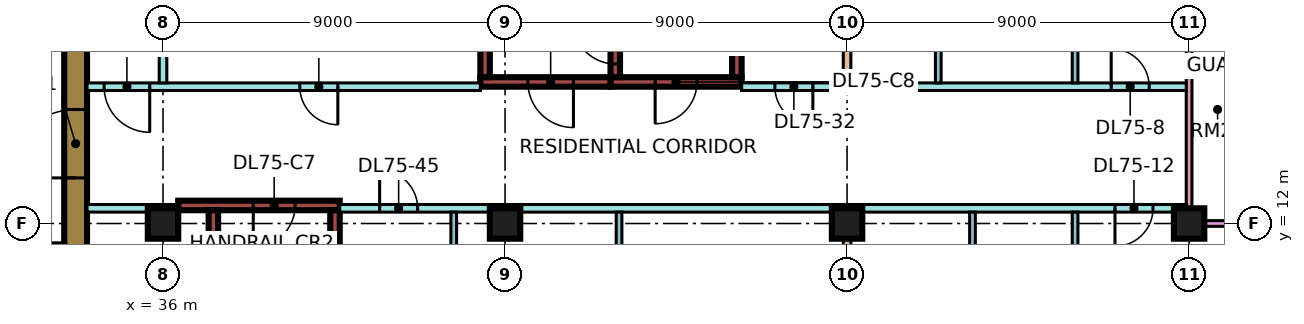
"""IFC4 building model, lengths in metres.
Left out: names, types, materials, properties, quantities, classifications, styles, units other than length and angle.
Written with IfcOpenShell. Run it as: python <this file> out.ifc"""

import sys

from ifc_helpers import new_model, si_unit, direction, frame, frame_2d, origin, origin_2d, place, context, subcontext, project, spatial, rectangle, extrude, element, fill, save


model = new_model("IFC4")
c1 = context("Model", 3, precision=1e-05, world=origin(), true_north=direction((0.0, 1.0)))
c2 = subcontext(c1, "Body", "Model", "MODEL_VIEW")
j1 = project(units=[si_unit("LENGTHUNIT", "METRE"), si_unit("PLANEANGLEUNIT", "RADIAN")], contexts=[c1])
p1 = place(None, origin())
s1 = spatial("IfcSite", under=j1, at=p1, CompositionType="ELEMENT")
p2 = place(p1, origin())
s2 = spatial("IfcBuilding", under=s1, at=p2, CompositionType="ELEMENT")
p3 = place(p2, frame((0.0, 0.0, 318.4)))
s3 = spatial("IfcBuildingStorey", under=s2, at=p3, CompositionType="ELEMENT", Elevation=318.4)
for number, where, z_axis, x_axis in (
    (1, (36.0, 12.0, 0.0), (0.0, 0.0, 1.0), (1.0, 0.0, 0.0)),
    (2, (45.0, 12.0, 0.0), (0.0, 0.0, 1.0), (1.0, 0.0, 0.0)),
    (3, (54.0, 12.0, 0.0), (0.0, 0.0, 1.0), (1.0, 0.0, 0.0)),
    (4, (63.0, 12.0, 0.0), (0.0, 0.0, 1.0), (1.0, 0.0, 0.0)),
):
    element("IfcColumn", number, at=place(p3, frame(where, z_axis=z_axis, x_axis=x_axis)), inside=s3, PredefinedType="COLUMN", context=c2, shape_type="SweptSolid", body=[
        extrude(rectangle(XDim=0.8, YDim=0.8, at=origin_2d()), origin(), (0.0, 0.0, 1.0), 3.75),
    ])
p4 = place(p3, frame((33.7, 7.6, 0.0), z_axis=(0.0, 0.0, 1.0), x_axis=(0.0, 1.0, 0.0)))
e5 = element("IfcWall", 5, at=p4, inside=s3, PredefinedType="SHEAR", context=c2, shape_type="SweptSolid", body=[
    extrude(rectangle(XDim=11.8, YDim=0.6, at=frame_2d((5.9, 0.0))), origin(), (0.0, 0.0, 1.0), 3.75),
])
p5 = place(p4, frame((5.6, 0.0, 0.0)))
e6 = element("IfcOpeningElement", 6, at=p5, cuts=e5, PredefinedType="OPENING", context=c2, shape_type="SweptSolid", body=[
    extrude(rectangle(XDim=1.8, YDim=2.4, at=frame_2d((0.9, 1.2))), frame((0.0, 0.31, 0.0), z_axis=(0.0, -1.0, 0.0), x_axis=(1.0, 0.0, 0.0)), (0.0, 0.0, 1.0), 0.62),
])
p6 = place(p3, frame((36.4, 12.475, 0.0), z_axis=(0.0, 0.0, 1.0), x_axis=(1.0, 0.0, 0.0)))
e7 = element("IfcWall", 7, at=p6, inside=s3, PredefinedType="SHEAR", context=c2, shape_type="SweptSolid", body=[
    extrude(rectangle(XDim=4.25, YDim=0.25, at=frame_2d((2.125, 0.0))), origin(), (0.0, 0.0, 1.0), 3.75),
])
p7 = place(p6, frame((1.975, 0.0, 0.0)))
e8 = element("IfcOpeningElement", 8, at=p7, cuts=e7, PredefinedType="OPENING", context=c2, shape_type="SweptSolid", body=[
    extrude(rectangle(XDim=1.1, YDim=2.2, at=frame_2d((0.55, 1.1))), frame((0.0, 0.135, 0.0), z_axis=(0.0, -1.0, 0.0), x_axis=(1.0, 0.0, 0.0)), (0.0, 0.0, 1.0), 0.27),
])
for number, where, z_axis, x_axis in (
    (9, (37.325, 5.85, 0.0), (0.0, 0.0, 1.0), (0.0, 1.0, 0.0)),
    (10, (40.525, 5.85, 0.0), (0.0, 0.0, 1.0), (0.0, 1.0, 0.0)),
):
    element("IfcWall", number, at=place(p3, frame(where, z_axis=z_axis, x_axis=x_axis)), inside=s3, PredefinedType="SHEAR", context=c2, shape_type="SweptSolid", body=[
        extrude(rectangle(XDim=6.5, YDim=0.25, at=frame_2d((3.25, 0.0))), origin(), (0.0, 0.0, 1.0), 3.75),
    ])
p8 = place(p3, frame((47.775, 15.725, 0.0), z_axis=(0.0, 0.0, 1.0), x_axis=(1.0, 0.0, 0.0)))
e11 = element("IfcWall", 11, at=p8, inside=s3, PredefinedType="SHEAR", context=c2, shape_type="SweptSolid", body=[
    extrude(rectangle(XDim=3.45, YDim=0.25, at=frame_2d((1.725, 0.0))), origin(), (0.0, 0.0, 1.0), 3.75),
])
p9 = place(p8, frame((1.175, 0.0, 0.0)))
e12 = element("IfcOpeningElement", 12, at=p9, cuts=e11, PredefinedType="OPENING", context=c2, shape_type="SweptSolid", body=[
    extrude(rectangle(XDim=1.1, YDim=2.2, at=frame_2d((0.55, 1.1))), frame((0.0, 0.135, 0.0), z_axis=(0.0, -1.0, 0.0), x_axis=(1.0, 0.0, 0.0)), (0.0, 0.0, 1.0), 0.27),
])
p10 = place(p3, frame((47.9, 15.85, 0.0), z_axis=(0.0, 0.0, 1.0), x_axis=(0.0, 1.0, 0.0)))
e13 = element("IfcWall", 13, at=p10, inside=s3, PredefinedType="SHEAR", context=c2, shape_type="SweptSolid", body=[
    extrude(rectangle(XDim=6.5, YDim=0.25, at=frame_2d((3.25, 0.0))), origin(), (0.0, 0.0, 1.0), 3.75),
])
p11 = place(p10, frame((0.35, 0.0, 0.0)))
e14 = element("IfcOpeningElement", 14, at=p11, cuts=e13, PredefinedType="OPENING", context=c2, shape_type="SweptSolid", body=[
    extrude(rectangle(XDim=1.1, YDim=2.2, at=frame_2d((0.55, 1.1))), frame((0.0, 0.135, 0.0), z_axis=(0.0, -1.0, 0.0), x_axis=(1.0, 0.0, 0.0)), (0.0, 0.0, 1.0), 0.27),
])
p12 = place(p3, frame((51.1, 15.85, 0.0), z_axis=(0.0, 0.0, 1.0), x_axis=(0.0, 1.0, 0.0)))
e15 = element("IfcWall", 15, at=p12, inside=s3, PredefinedType="SHEAR", context=c2, shape_type="SweptSolid", body=[
    extrude(rectangle(XDim=6.5, YDim=0.25, at=frame_2d((3.25, 0.0))), origin(), (0.0, 0.0, 1.0), 3.75),
])
p13 = place(p3, frame((44.35, 15.725, 0.0), z_axis=(0.0, 0.0, 1.0), x_axis=(1.0, 0.0, 0.0)))
e16 = element("IfcWall", 16, at=p13, inside=s3, PredefinedType="SHEAR", context=c2, shape_type="SweptSolid", body=[
    extrude(rectangle(XDim=3.425, YDim=0.25, at=frame_2d((1.712, 0.0))), origin(), (0.0, 0.0, 1.0), 3.75),
])
p14 = place(p13, frame((1.25, 0.0, 0.0)))
e17 = element("IfcOpeningElement", 17, at=p14, cuts=e16, PredefinedType="OPENING", context=c2, shape_type="SweptSolid", body=[
    extrude(rectangle(XDim=1.2, YDim=2.2, at=frame_2d((0.6, 1.1))), frame((0.0, 0.135, 0.0), z_axis=(0.0, -1.0, 0.0), x_axis=(1.0, 0.0, 0.0)), (0.0, 0.0, 1.0), 0.27),
])
p15 = place(p3, frame((44.475, 15.85, 0.0), z_axis=(0.0, 0.0, 1.0), x_axis=(0.0, 1.0, 0.0)))
e18 = element("IfcWall", 18, at=p15, inside=s3, PredefinedType="SHEAR", context=c2, shape_type="SweptSolid", body=[
    extrude(rectangle(XDim=6.5, YDim=0.25, at=frame_2d((3.25, 0.0))), origin(), (0.0, 0.0, 1.0), 3.75),
])
p16 = place(p15, frame((1.75, 0.0, 0.0)))
e19 = element("IfcOpeningElement", 19, at=p16, cuts=e18, PredefinedType="OPENING", context=c2, shape_type="SweptSolid", body=[
    extrude(rectangle(XDim=1.1, YDim=2.2, at=frame_2d((0.55, 1.1))), frame((0.0, 0.135, 0.0), z_axis=(0.0, -1.0, 0.0), x_axis=(1.0, 0.0, 0.0)), (0.0, 0.0, 1.0), 0.27),
])
p17 = place(p15, frame((4.3, 0.0, 0.0)))
e20 = element("IfcOpeningElement", 20, at=p17, cuts=e18, PredefinedType="OPENING", context=c2, shape_type="SweptSolid", body=[
    extrude(rectangle(XDim=1.1, YDim=2.2, at=frame_2d((0.55, 1.1))), frame((0.0, 0.135, 0.0), z_axis=(0.0, -1.0, 0.0), x_axis=(1.0, 0.0, 0.0)), (0.0, 0.0, 1.0), 0.27),
])
p18 = place(p3, frame((63.0, 12.075, 0.0), z_axis=(0.0, 0.0, 1.0), x_axis=(0.0, 1.0, 0.0)))
e21 = element("IfcWall", 21, at=p18, inside=s3, PredefinedType="SOLIDWALL", context=c2, shape_type="SweptSolid", body=[
    extrude(rectangle(XDim=10.35, YDim=0.15, at=frame_2d((5.175, 0.0))), origin(), (0.0, 0.0, 1.0), 3.3),
])
p19 = place(p18, frame((6.038, 0.0, 0.0)))
e22 = element("IfcOpeningElement", 22, at=p19, cuts=e21, PredefinedType="OPENING", context=c2, shape_type="SweptSolid", body=[
    extrude(rectangle(XDim=1.8, YDim=2.4, at=frame_2d((0.9, 1.2))), frame((0.0, 0.085, 0.0), z_axis=(0.0, -1.0, 0.0), x_axis=(1.0, 0.0, 0.0)), (0.0, 0.0, 1.0), 0.17),
])
p20 = place(p3, frame((64.5, 12.0, 0.0), z_axis=(0.0, 0.0, 1.0), x_axis=(-1.0, 0.0, 0.0)))
e23 = element("IfcWall", 23, at=p20, inside=s3, PredefinedType="SOLIDWALL", context=c2, shape_type="SweptSolid", body=[
    extrude(rectangle(XDim=1.5, YDim=0.15, at=frame_2d((0.75, 0.0))), origin(), (0.0, 0.0, 1.0), 3.3),
])
p21 = place(p3, frame((34.0, 12.4, 0.0), z_axis=(0.0, 0.0, 1.0), x_axis=(1.0, 0.0, 0.0)))
e24 = element("IfcWall", 24, at=p21, inside=s3, PredefinedType="PARTITIONING", context=c2, shape_type="SweptSolid", body=[
    extrude(rectangle(XDim=2.401, YDim=0.2, at=frame_2d((1.2, 0.0))), origin(), (0.0, 0.0, 1.0), 3.3),
])
p22 = place(p3, frame((34.0, 15.6, 0.0), z_axis=(0.0, 0.0, 1.0), x_axis=(1.0, 0.0, 0.0)))
e25 = element("IfcWall", 25, at=p22, inside=s3, PredefinedType="PARTITIONING", context=c2, shape_type="SweptSolid", body=[
    extrude(rectangle(XDim=10.35, YDim=0.2, at=frame_2d((5.175, 0.0))), origin(), (0.0, 0.0, 1.0), 3.3),
])
p23 = place(p22, frame((5.6, 0.0, 0.0)))
e26 = element("IfcOpeningElement", 26, at=p23, cuts=e25, PredefinedType="OPENING", context=c2, shape_type="SweptSolid", body=[
    extrude(rectangle(XDim=1.0, YDim=2.1, at=frame_2d((0.5, 1.05))), frame((0.0, 0.11, 0.0), z_axis=(0.0, -1.0, 0.0), x_axis=(1.0, 0.0, 0.0)), (0.0, 0.0, 1.0), 0.22),
])
p24 = place(p22, frame((0.45, 0.0, 0.0)))
e27 = element("IfcOpeningElement", 27, at=p24, cuts=e25, PredefinedType="OPENING", context=c2, shape_type="SweptSolid", body=[
    extrude(rectangle(XDim=1.2, YDim=2.1, at=frame_2d((0.6, 1.05))), frame((0.0, 0.11, 0.0), z_axis=(0.0, -1.0, 0.0), x_axis=(1.0, 0.0, 0.0)), (0.0, 0.0, 1.0), 0.22),
])
p25 = place(p3, frame((36.0, 15.7, 0.0), z_axis=(0.0, 0.0, 1.0), x_axis=(0.0, 1.0, 0.0)))
e28 = element("IfcWall", 28, at=p25, inside=s3, PredefinedType="PARTITIONING", context=c2, shape_type="SweptSolid", body=[
    extrude(rectangle(XDim=8.3, YDim=0.2, at=frame_2d((4.15, 0.0))), origin(), (0.0, 0.0, 1.0), 3.3),
])
p26 = place(p3, frame((40.65, 12.4, 0.0), z_axis=(0.0, 0.0, 1.0), x_axis=(1.0, 0.0, 0.0)))
e29 = element("IfcWall", 29, at=p26, inside=s3, PredefinedType="PARTITIONING", context=c2, shape_type="SweptSolid", body=[
    extrude(rectangle(XDim=22.276, YDim=0.2, at=frame_2d((11.138, 0.0))), origin(), (0.0, 0.0, 1.0), 3.3),
])
p27 = place(p26, frame((20.4, 0.0, 0.0)))
e30 = element("IfcOpeningElement", 30, at=p27, cuts=e29, PredefinedType="OPENING", context=c2, shape_type="SweptSolid", body=[
    extrude(rectangle(XDim=1.0, YDim=2.1, at=frame_2d((0.5, 1.05))), frame((0.0, 0.11, 0.0), z_axis=(0.0, -1.0, 0.0), x_axis=(1.0, 0.0, 0.0)), (0.0, 0.0, 1.0), 0.22),
])
p28 = place(p26, frame((1.05, 0.0, 0.0)))
e31 = element("IfcOpeningElement", 31, at=p28, cuts=e29, PredefinedType="OPENING", context=c2, shape_type="SweptSolid", body=[
    extrude(rectangle(XDim=1.0, YDim=2.1, at=frame_2d((0.5, 1.05))), frame((0.0, 0.11, 0.0), z_axis=(0.0, -1.0, 0.0), x_axis=(1.0, 0.0, 0.0)), (0.0, 0.0, 1.0), 0.22),
])
p29 = place(p3, frame((43.65, 5.975, 0.0), z_axis=(0.0, 0.0, 1.0), x_axis=(0.0, 1.0, 0.0)))
e32 = element("IfcWall", 32, at=p29, inside=s3, PredefinedType="PARTITIONING", context=c2, shape_type="SweptSolid", body=[
    extrude(rectangle(XDim=6.325, YDim=0.15, at=frame_2d((3.163, 0.0))), origin(), (0.0, 0.0, 1.0), 3.3),
])
p30 = place(p29, frame((4.275, 0.0, 0.0)))
e33 = element("IfcOpeningElement", 33, at=p30, cuts=e32, PredefinedType="OPENING", context=c2, shape_type="SweptSolid", body=[
    extrude(rectangle(XDim=0.9, YDim=2.1, at=frame_2d((0.45, 1.05))), frame((0.0, 0.085, 0.0), z_axis=(0.0, -1.0, 0.0), x_axis=(1.0, 0.0, 0.0)), (0.0, 0.0, 1.0), 0.17),
])
p31 = place(p3, frame((48.0, 5.975, 0.0), z_axis=(0.0, 0.0, 1.0), x_axis=(0.0, 1.0, 0.0)))
e34 = element("IfcWall", 34, at=p31, inside=s3, PredefinedType="PARTITIONING", context=c2, shape_type="SweptSolid", body=[
    extrude(rectangle(XDim=6.325, YDim=0.15, at=frame_2d((3.163, 0.0))), origin(), (0.0, 0.0, 1.0), 3.3),
])
p32 = place(p3, frame((51.225, 15.6, 0.0), z_axis=(0.0, 0.0, 1.0), x_axis=(1.0, 0.0, 0.0)))
e35 = element("IfcWall", 35, at=p32, inside=s3, PredefinedType="PARTITIONING", context=c2, shape_type="SweptSolid", body=[
    extrude(rectangle(XDim=11.701, YDim=0.2, at=frame_2d((5.851, 0.0))), origin(), (0.0, 0.0, 1.0), 3.3),
])
p33 = place(p32, frame((9.725, 0.0, 0.0)))
e36 = element("IfcOpeningElement", 36, at=p33, cuts=e35, PredefinedType="OPENING", context=c2, shape_type="SweptSolid", body=[
    extrude(rectangle(XDim=1.0, YDim=2.1, at=frame_2d((0.5, 1.05))), frame((0.0, 0.11, 0.0), z_axis=(0.0, -1.0, 0.0), x_axis=(1.0, 0.0, 0.0)), (0.0, 0.0, 1.0), 0.22),
])
p34 = place(p32, frame((0.875, 0.0, 0.0)))
e37 = element("IfcOpeningElement", 37, at=p34, cuts=e35, PredefinedType="OPENING", context=c2, shape_type="SweptSolid", body=[
    extrude(rectangle(XDim=1.0, YDim=2.1, at=frame_2d((0.5, 1.05))), frame((0.0, 0.11, 0.0), z_axis=(0.0, -1.0, 0.0), x_axis=(1.0, 0.0, 0.0)), (0.0, 0.0, 1.0), 0.22),
])
p35 = place(p3, frame((54.0, 0.0, 0.0), z_axis=(0.0, 0.0, 1.0), x_axis=(0.0, 1.0, 0.0)))
e38 = element("IfcWall", 38, at=p35, inside=s3, PredefinedType="PARTITIONING", context=c2, shape_type="SweptSolid", body=[
    extrude(rectangle(XDim=12.3, YDim=0.2, at=frame_2d((6.15, 0.0))), origin(), (0.0, 0.0, 1.0), 3.3),
])
p36 = place(p3, frame((54.0, 15.7, 0.0), z_axis=(0.0, 0.0, 1.0), x_axis=(0.0, 1.0, 0.0)))
e39 = element("IfcWall", 39, at=p36, inside=s3, PredefinedType="PARTITIONING", context=c2, shape_type="SweptSolid", body=[
    extrude(rectangle(XDim=8.3, YDim=0.2, at=frame_2d((4.15, 0.0))), origin(), (0.0, 0.0, 1.0), 3.3),
])
p37 = place(p3, frame((56.4, 15.7, 0.0), z_axis=(0.0, 0.0, 1.0), x_axis=(0.0, 1.0, 0.0)))
e40 = element("IfcWall", 40, at=p37, inside=s3, PredefinedType="PARTITIONING", context=c2, shape_type="SweptSolid", body=[
    extrude(rectangle(XDim=2.525, YDim=0.15, at=frame_2d((1.263, 0.0))), origin(), (0.0, 0.0, 1.0), 3.3),
])
p38 = place(p3, frame((57.3, 7.075, 0.0), z_axis=(0.0, 0.0, 1.0), x_axis=(0.0, 1.0, 0.0)))
e41 = element("IfcWall", 41, at=p38, inside=s3, PredefinedType="PARTITIONING", context=c2, shape_type="SweptSolid", body=[
    extrude(rectangle(XDim=5.225, YDim=0.15, at=frame_2d((2.613, 0.0))), origin(), (0.0, 0.0, 1.0), 3.3),
])
p39 = place(p3, frame((60.0, 7.075, 0.0), z_axis=(0.0, 0.0, 1.0), x_axis=(0.0, 1.0, 0.0)))
e42 = element("IfcWall", 42, at=p39, inside=s3, PredefinedType="PARTITIONING", context=c2, shape_type="SweptSolid", body=[
    extrude(rectangle(XDim=5.225, YDim=0.15, at=frame_2d((2.613, 0.0))), origin(), (0.0, 0.0, 1.0), 3.3),
])
p40 = place(p39, frame((2.275, 0.0, 0.0)))
e43 = element("IfcOpeningElement", 43, at=p40, cuts=e42, PredefinedType="OPENING", context=c2, shape_type="SweptSolid", body=[
    extrude(rectangle(XDim=0.8, YDim=2.1, at=frame_2d((0.4, 1.05))), frame((0.0, 0.085, 0.0), z_axis=(0.0, -1.0, 0.0), x_axis=(1.0, 0.0, 0.0)), (0.0, 0.0, 1.0), 0.17),
])
p41 = place(p3, frame((60.0, 15.7, 0.0), z_axis=(0.0, 0.0, 1.0), x_axis=(0.0, 1.0, 0.0)))
e44 = element("IfcWall", 44, at=p41, inside=s3, PredefinedType="PARTITIONING", context=c2, shape_type="SweptSolid", body=[
    extrude(rectangle(XDim=2.525, YDim=0.15, at=frame_2d((1.263, 0.0))), origin(), (0.0, 0.0, 1.0), 3.3),
])
p42 = place(p41, frame((0.9, 0.0, 0.0)))
e45 = element("IfcOpeningElement", 45, at=p42, cuts=e44, PredefinedType="OPENING", context=c2, shape_type="SweptSolid", body=[
    extrude(rectangle(XDim=0.8, YDim=2.1, at=frame_2d((0.4, 1.05))), frame((0.0, 0.085, 0.0), z_axis=(0.0, -1.0, 0.0), x_axis=(1.0, 0.0, 0.0)), (0.0, 0.0, 1.0), 0.17),
])
p43 = place(p5, origin())
e46 = element("IfcDoor", 46, at=p43, inside=s3, OperationType="DOUBLE_DOOR_SINGLE_SWING", PredefinedType="DOOR", context=c2, shape_type="SweptSolid", body=[
    extrude(rectangle(XDim=1.8, YDim=2.4, at=frame_2d((0.9, 1.2))), frame((0.0, 0.025, 0.0), z_axis=(0.0, -1.0, 0.0), x_axis=(1.0, 0.0, 0.0)), (0.0, 0.0, 1.0), 0.05),
])
fill(e6, e46)
p44 = place(p7, frame((1.1, 0.0, 0.0), z_axis=(0.0, 0.0, 1.0), x_axis=(-1.0, 0.0, 0.0)))
e47 = element("IfcDoor", 47, at=p44, inside=s3, OperationType="SINGLE_SWING_LEFT", PredefinedType="DOOR", context=c2, shape_type="SweptSolid", body=[
    extrude(rectangle(XDim=1.1, YDim=2.2, at=frame_2d((0.55, 1.1))), frame((0.0, 0.025, 0.0), z_axis=(0.0, -1.0, 0.0), x_axis=(1.0, 0.0, 0.0)), (0.0, 0.0, 1.0), 0.05),
])
fill(e8, e47)
p45 = place(p9, frame((1.1, 0.0, 0.0), z_axis=(0.0, 0.0, 1.0), x_axis=(-1.0, 0.0, 0.0)))
e48 = element("IfcDoor", 48, at=p45, inside=s3, OperationType="SINGLE_SWING_LEFT", PredefinedType="DOOR", context=c2, shape_type="SweptSolid", body=[
    extrude(rectangle(XDim=1.1, YDim=2.2, at=frame_2d((0.55, 1.1))), frame((0.0, 0.025, 0.0), z_axis=(0.0, -1.0, 0.0), x_axis=(1.0, 0.0, 0.0)), (0.0, 0.0, 1.0), 0.05),
])
fill(e12, e48)
p46 = place(p14, origin())
e49 = element("IfcDoor", 49, at=p46, inside=s3, OperationType="SINGLE_SWING_RIGHT", PredefinedType="DOOR", context=c2, shape_type="SweptSolid", body=[
    extrude(rectangle(XDim=1.2, YDim=2.2, at=frame_2d((0.6, 1.1))), frame((0.0, 0.025, 0.0), z_axis=(0.0, -1.0, 0.0), x_axis=(1.0, 0.0, 0.0)), (0.0, 0.0, 1.0), 0.05),
])
fill(e17, e49)
p47 = place(p11, frame((1.1, 0.0, 0.0), z_axis=(0.0, 0.0, 1.0), x_axis=(-1.0, 0.0, 0.0)))
e50 = element("IfcDoor", 50, at=p47, inside=s3, OperationType="SINGLE_SWING_RIGHT", PredefinedType="DOOR", context=c2, shape_type="SweptSolid", body=[
    extrude(rectangle(XDim=1.1, YDim=2.2, at=frame_2d((0.55, 1.1))), frame((0.0, 0.025, 0.0), z_axis=(0.0, -1.0, 0.0), x_axis=(1.0, 0.0, 0.0)), (0.0, 0.0, 1.0), 0.05),
])
fill(e14, e50)
p48 = place(p23, origin())
e51 = element("IfcDoor", 51, at=p48, inside=s3, OperationType="SINGLE_SWING_RIGHT", PredefinedType="DOOR", context=c2, shape_type="SweptSolid", body=[
    extrude(rectangle(XDim=1.0, YDim=2.1, at=frame_2d((0.5, 1.05))), frame((0.0, 0.025, 0.0), z_axis=(0.0, -1.0, 0.0), x_axis=(1.0, 0.0, 0.0)), (0.0, 0.0, 1.0), 0.05),
])
fill(e26, e51)
p49 = place(p33, origin())
e52 = element("IfcDoor", 52, at=p49, inside=s3, OperationType="SINGLE_SWING_LEFT", PredefinedType="DOOR", context=c2, shape_type="SweptSolid", body=[
    extrude(rectangle(XDim=1.0, YDim=2.1, at=frame_2d((0.5, 1.05))), frame((0.0, 0.025, 0.0), z_axis=(0.0, -1.0, 0.0), x_axis=(1.0, 0.0, 0.0)), (0.0, 0.0, 1.0), 0.05),
])
fill(e36, e52)
p50 = place(p27, frame((1.0, 0.0, 0.0), z_axis=(0.0, 0.0, 1.0), x_axis=(-1.0, 0.0, 0.0)))
e53 = element("IfcDoor", 53, at=p50, inside=s3, OperationType="SINGLE_SWING_LEFT", PredefinedType="DOOR", context=c2, shape_type="SweptSolid", body=[
    extrude(rectangle(XDim=1.0, YDim=2.1, at=frame_2d((0.5, 1.05))), frame((0.0, 0.025, 0.0), z_axis=(0.0, -1.0, 0.0), x_axis=(1.0, 0.0, 0.0)), (0.0, 0.0, 1.0), 0.05),
])
fill(e30, e53)
p51 = place(p24, origin())
e54 = element("IfcDoor", 54, at=p51, inside=s3, OperationType="SINGLE_SWING_RIGHT", PredefinedType="DOOR", context=c2, shape_type="SweptSolid", body=[
    extrude(rectangle(XDim=1.2, YDim=2.1, at=frame_2d((0.6, 1.05))), frame((0.0, 0.025, 0.0), z_axis=(0.0, -1.0, 0.0), x_axis=(1.0, 0.0, 0.0)), (0.0, 0.0, 1.0), 0.05),
])
fill(e27, e54)
p52 = place(p34, origin())
e55 = element("IfcDoor", 55, at=p52, inside=s3, OperationType="SINGLE_SWING_RIGHT", PredefinedType="DOOR", context=c2, shape_type="SweptSolid", body=[
    extrude(rectangle(XDim=1.0, YDim=2.1, at=frame_2d((0.5, 1.05))), frame((0.0, 0.025, 0.0), z_axis=(0.0, -1.0, 0.0), x_axis=(1.0, 0.0, 0.0)), (0.0, 0.0, 1.0), 0.05),
])
fill(e37, e55)
p53 = place(p28, origin())
e56 = element("IfcDoor", 56, at=p53, inside=s3, OperationType="SINGLE_SWING_LEFT", PredefinedType="DOOR", context=c2, shape_type="SweptSolid", body=[
    extrude(rectangle(XDim=1.0, YDim=2.1, at=frame_2d((0.5, 1.05))), frame((0.0, 0.025, 0.0), z_axis=(0.0, -1.0, 0.0), x_axis=(1.0, 0.0, 0.0)), (0.0, 0.0, 1.0), 0.05),
])
fill(e31, e56)
save(model, sys.argv[1])
